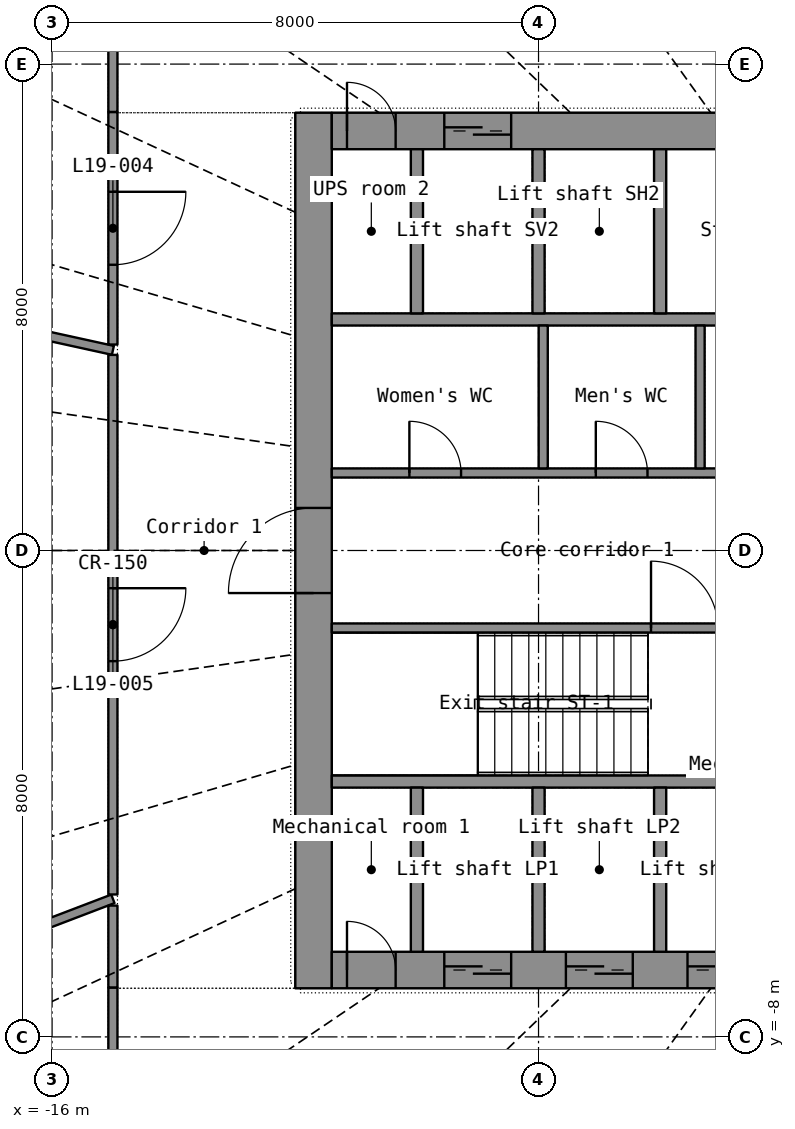
"""IFC4 building model, lengths in metres.
Left out: names, types, materials, properties, quantities, classifications, styles, units other than length and angle.
Written with IfcOpenShell. Run it as: python <this file> out.ifc"""

import sys

from ifc_helpers import new_model, si_unit, direction, frame, frame_2d, origin, place, context, subcontext, project, spatial, rectangle, extrude, element, fill, save


model = new_model("IFC4")
c1 = context("Model", 3, precision=1e-05, world=origin(), true_north=direction((0.0, 1.0)))
c2 = subcontext(c1, "Body", "Model", "MODEL_VIEW")
j1 = project(units=[si_unit("LENGTHUNIT", "METRE"), si_unit("PLANEANGLEUNIT", "RADIAN")], contexts=[c1])
p1 = place(None, origin())
s1 = spatial("IfcSite", under=j1, at=p1, CompositionType="ELEMENT")
p2 = place(p1, origin())
s2 = spatial("IfcBuilding", under=s1, at=p2, CompositionType="ELEMENT")
p3 = place(p2, frame((0.0, 0.0, 81.5)))
s3 = spatial("IfcBuildingStorey", under=s2, at=p3, CompositionType="ELEMENT", Elevation=81.5)
p4 = place(p3, frame((-11.7, -7.2, 0.0), z_axis=(0.0, 0.0, 1.0), x_axis=(0.0, 1.0, 0.0)))
e1 = element("IfcWall", 1, at=p4, inside=s3, PredefinedType="SHEAR", context=c2, shape_type="SweptSolid", body=[
    extrude(rectangle(XDim=14.4, YDim=0.6, at=frame_2d((7.2, 0.0))), origin(), (0.0, 0.0, 1.0), 3.3),
])
p5 = place(p4, frame((6.5, 0.0, 0.0)))
e2 = element("IfcOpeningElement", 2, at=p5, cuts=e1, PredefinedType="OPENING", context=c2, shape_type="SweptSolid", body=[
    extrude(rectangle(XDim=1.4, YDim=2.2, at=frame_2d((0.7, 1.1))), frame((0.0, 0.31, 0.0), z_axis=(0.0, -1.0, 0.0), x_axis=(1.0, 0.0, 0.0)), (0.0, 0.0, 1.0), 0.62),
])
p6 = place(p3, frame((-11.4, -6.9, 0.0), z_axis=(0.0, 0.0, 1.0), x_axis=(1.0, 0.0, 0.0)))
e3 = element("IfcWall", 3, at=p6, inside=s3, PredefinedType="SHEAR", context=c2, shape_type="SweptSolid", body=[
    extrude(rectangle(XDim=22.8, YDim=0.6, at=frame_2d((11.4, 0.0))), origin(), (0.0, 0.0, 1.0), 3.3),
])
p7 = place(p6, frame((1.85, 0.0, 0.0)))
e4 = element("IfcOpeningElement", 4, at=p7, cuts=e3, PredefinedType="OPENING", context=c2, shape_type="SweptSolid", body=[
    extrude(rectangle(XDim=1.1, YDim=2.2, at=frame_2d((0.55, 1.1))), frame((0.0, 0.31, 0.0), z_axis=(0.0, -1.0, 0.0), x_axis=(1.0, 0.0, 0.0)), (0.0, 0.0, 1.0), 0.62),
])
p8 = place(p6, frame((3.85, 0.0, 0.0)))
e5 = element("IfcOpeningElement", 5, at=p8, cuts=e3, PredefinedType="OPENING", context=c2, shape_type="SweptSolid", body=[
    extrude(rectangle(XDim=1.1, YDim=2.2, at=frame_2d((0.55, 1.1))), frame((0.0, 0.31, 0.0), z_axis=(0.0, -1.0, 0.0), x_axis=(1.0, 0.0, 0.0)), (0.0, 0.0, 1.0), 0.62),
])
p9 = place(p6, frame((5.85, 0.0, 0.0)))
e6 = element("IfcOpeningElement", 6, at=p9, cuts=e3, PredefinedType="OPENING", context=c2, shape_type="SweptSolid", body=[
    extrude(rectangle(XDim=1.1, YDim=2.2, at=frame_2d((0.55, 1.1))), frame((0.0, 0.31, 0.0), z_axis=(0.0, -1.0, 0.0), x_axis=(1.0, 0.0, 0.0)), (0.0, 0.0, 1.0), 0.62),
])
p10 = place(p6, frame((7.85, 0.0, 0.0)))
e7 = element("IfcOpeningElement", 7, at=p10, cuts=e3, PredefinedType="OPENING", context=c2, shape_type="SweptSolid", body=[
    extrude(rectangle(XDim=1.1, YDim=2.2, at=frame_2d((0.55, 1.1))), frame((0.0, 0.31, 0.0), z_axis=(0.0, -1.0, 0.0), x_axis=(1.0, 0.0, 0.0)), (0.0, 0.0, 1.0), 0.62),
])
p11 = place(p6, frame((9.85, 0.0, 0.0)))
e8 = element("IfcOpeningElement", 8, at=p11, cuts=e3, PredefinedType="OPENING", context=c2, shape_type="SweptSolid", body=[
    extrude(rectangle(XDim=1.1, YDim=2.2, at=frame_2d((0.55, 1.1))), frame((0.0, 0.31, 0.0), z_axis=(0.0, -1.0, 0.0), x_axis=(1.0, 0.0, 0.0)), (0.0, 0.0, 1.0), 0.62),
])
p12 = place(p6, frame((11.85, 0.0, 0.0)))
e9 = element("IfcOpeningElement", 9, at=p12, cuts=e3, PredefinedType="OPENING", context=c2, shape_type="SweptSolid", body=[
    extrude(rectangle(XDim=1.1, YDim=2.2, at=frame_2d((0.55, 1.1))), frame((0.0, 0.31, 0.0), z_axis=(0.0, -1.0, 0.0), x_axis=(1.0, 0.0, 0.0)), (0.0, 0.0, 1.0), 0.62),
])
p13 = place(p6, frame((13.85, 0.0, 0.0)))
e10 = element("IfcOpeningElement", 10, at=p13, cuts=e3, PredefinedType="OPENING", context=c2, shape_type="SweptSolid", body=[
    extrude(rectangle(XDim=1.1, YDim=2.2, at=frame_2d((0.55, 1.1))), frame((0.0, 0.31, 0.0), z_axis=(0.0, -1.0, 0.0), x_axis=(1.0, 0.0, 0.0)), (0.0, 0.0, 1.0), 0.62),
])
p14 = place(p6, frame((15.85, 0.0, 0.0)))
e11 = element("IfcOpeningElement", 11, at=p14, cuts=e3, PredefinedType="OPENING", context=c2, shape_type="SweptSolid", body=[
    extrude(rectangle(XDim=1.1, YDim=2.2, at=frame_2d((0.55, 1.1))), frame((0.0, 0.31, 0.0), z_axis=(0.0, -1.0, 0.0), x_axis=(1.0, 0.0, 0.0)), (0.0, 0.0, 1.0), 0.62),
])
p15 = place(p6, frame((19.85, 0.0, 0.0)))
e12 = element("IfcOpeningElement", 12, at=p15, cuts=e3, PredefinedType="OPENING", context=c2, shape_type="SweptSolid", body=[
    extrude(rectangle(XDim=1.1, YDim=2.2, at=frame_2d((0.55, 1.1))), frame((0.0, 0.31, 0.0), z_axis=(0.0, -1.0, 0.0), x_axis=(1.0, 0.0, 0.0)), (0.0, 0.0, 1.0), 0.62),
])
p16 = place(p6, frame((0.25, 0.0, 0.0)))
e13 = element("IfcOpeningElement", 13, at=p16, cuts=e3, PredefinedType="OPENING", context=c2, shape_type="SweptSolid", body=[
    extrude(rectangle(XDim=0.8, YDim=2.05, at=frame_2d((0.4, 1.025))), frame((0.0, 0.31, 0.0), z_axis=(0.0, -1.0, 0.0), x_axis=(1.0, 0.0, 0.0)), (0.0, 0.0, 1.0), 0.62),
])
p17 = place(p6, frame((21.75, 0.0, 0.0)))
e14 = element("IfcOpeningElement", 14, at=p17, cuts=e3, PredefinedType="OPENING", context=c2, shape_type="SweptSolid", body=[
    extrude(rectangle(XDim=0.8, YDim=2.05, at=frame_2d((0.4, 1.025))), frame((0.0, 0.31, 0.0), z_axis=(0.0, -1.0, 0.0), x_axis=(1.0, 0.0, 0.0)), (0.0, 0.0, 1.0), 0.62),
])
p18 = place(p3, frame((-11.4, 6.9, 0.0), z_axis=(0.0, 0.0, 1.0), x_axis=(1.0, 0.0, 0.0)))
e15 = element("IfcWall", 15, at=p18, inside=s3, PredefinedType="SHEAR", context=c2, shape_type="SweptSolid", body=[
    extrude(rectangle(XDim=22.8, YDim=0.6, at=frame_2d((11.4, 0.0))), origin(), (0.0, 0.0, 1.0), 3.3),
])
p19 = place(p18, frame((1.85, 0.0, 0.0)))
e16 = element("IfcOpeningElement", 16, at=p19, cuts=e15, PredefinedType="OPENING", context=c2, shape_type="SweptSolid", body=[
    extrude(rectangle(XDim=1.1, YDim=2.2, at=frame_2d((0.55, 1.1))), frame((0.0, 0.31, 0.0), z_axis=(0.0, -1.0, 0.0), x_axis=(1.0, 0.0, 0.0)), (0.0, 0.0, 1.0), 0.62),
])
p20 = place(p18, frame((6.95, 0.0, 0.0)))
e17 = element("IfcOpeningElement", 17, at=p20, cuts=e15, PredefinedType="OPENING", context=c2, shape_type="SweptSolid", body=[
    extrude(rectangle(XDim=0.9, YDim=2.1, at=frame_2d((0.45, 1.05))), frame((0.0, 0.31, 0.0), z_axis=(0.0, -1.0, 0.0), x_axis=(1.0, 0.0, 0.0)), (0.0, 0.0, 1.0), 0.62),
])
p21 = place(p18, frame((12.95, 0.0, 0.0)))
e18 = element("IfcOpeningElement", 18, at=p21, cuts=e15, PredefinedType="OPENING", context=c2, shape_type="SweptSolid", body=[
    extrude(rectangle(XDim=0.9, YDim=2.1, at=frame_2d((0.45, 1.05))), frame((0.0, 0.31, 0.0), z_axis=(0.0, -1.0, 0.0), x_axis=(1.0, 0.0, 0.0)), (0.0, 0.0, 1.0), 0.62),
])
p22 = place(p18, frame((18.95, 0.0, 0.0)))
e19 = element("IfcOpeningElement", 19, at=p22, cuts=e15, PredefinedType="OPENING", context=c2, shape_type="SweptSolid", body=[
    extrude(rectangle(XDim=0.9, YDim=2.1, at=frame_2d((0.45, 1.05))), frame((0.0, 0.31, 0.0), z_axis=(0.0, -1.0, 0.0), x_axis=(1.0, 0.0, 0.0)), (0.0, 0.0, 1.0), 0.62),
])
p23 = place(p18, frame((0.25, 0.0, 0.0)))
e20 = element("IfcOpeningElement", 20, at=p23, cuts=e15, PredefinedType="OPENING", context=c2, shape_type="SweptSolid", body=[
    extrude(rectangle(XDim=0.8, YDim=2.05, at=frame_2d((0.4, 1.025))), frame((0.0, 0.31, 0.0), z_axis=(0.0, -1.0, 0.0), x_axis=(1.0, 0.0, 0.0)), (0.0, 0.0, 1.0), 0.62),
])
p24 = place(p18, frame((21.75, 0.0, 0.0)))
e21 = element("IfcOpeningElement", 21, at=p24, cuts=e15, PredefinedType="OPENING", context=c2, shape_type="SweptSolid", body=[
    extrude(rectangle(XDim=0.8, YDim=2.05, at=frame_2d((0.4, 1.025))), frame((0.0, 0.31, 0.0), z_axis=(0.0, -1.0, 0.0), x_axis=(1.0, 0.0, 0.0)), (0.0, 0.0, 1.0), 0.62),
])
for number, where, z_axis, x_axis in (
    (22, (-11.4, -3.8, 0.0), (0.0, 0.0, 1.0), (1.0, 0.0, 0.0)),
    (23, (-11.4, 3.8, 0.0), (0.0, 0.0, 1.0), (1.0, 0.0, 0.0)),
):
    element("IfcWall", number, at=place(p3, frame(where, z_axis=z_axis, x_axis=x_axis)), inside=s3, PredefinedType="SHEAR", context=c2, shape_type="SweptSolid", body=[
        extrude(rectangle(XDim=22.8, YDim=0.2, at=frame_2d((11.4, 0.0))), origin(), (0.0, 0.0, 1.0), 3.3),
    ])
for number, where, z_axis, x_axis in (
    (24, (-10.0, -6.6, 0.0), (0.0, 0.0, 1.0), (0.0, 1.0, 0.0)),
    (25, (-8.0, -6.6, 0.0), (0.0, 0.0, 1.0), (0.0, 1.0, 0.0)),
    (26, (-6.0, -6.6, 0.0), (0.0, 0.0, 1.0), (0.0, 1.0, 0.0)),
    (27, (-10.0, 3.9, 0.0), (0.0, 0.0, 1.0), (0.0, 1.0, 0.0)),
    (28, (-8.0, 3.9, 0.0), (0.0, 0.0, 1.0), (0.0, 1.0, 0.0)),
    (29, (-6.0, 3.9, 0.0), (0.0, 0.0, 1.0), (0.0, 1.0, 0.0)),
):
    element("IfcWall", number, at=place(p3, frame(where, z_axis=z_axis, x_axis=x_axis)), inside=s3, PredefinedType="SHEAR", context=c2, shape_type="SweptSolid", body=[
        extrude(rectangle(XDim=2.7, YDim=0.2, at=frame_2d((1.35, 0.0))), origin(), (0.0, 0.0, 1.0), 3.3),
    ])
p25 = place(p3, frame((-11.4, -1.275, 0.0), z_axis=(0.0, 0.0, 1.0), x_axis=(1.0, 0.0, 0.0)))
e30 = element("IfcWall", 30, at=p25, inside=s3, PredefinedType="SHEAR", context=c2, shape_type="SweptSolid", body=[
    extrude(rectangle(XDim=8.4, YDim=0.15, at=frame_2d((4.2, 0.0))), origin(), (0.0, 0.0, 1.0), 3.3),
])
p26 = place(p25, frame((5.25, 0.0, 0.0)))
e31 = element("IfcOpeningElement", 31, at=p26, cuts=e30, PredefinedType="OPENING", context=c2, shape_type="SweptSolid", body=[
    extrude(rectangle(XDim=1.1, YDim=2.15, at=frame_2d((0.55, 1.075))), frame((0.0, 0.085, 0.0), z_axis=(0.0, -1.0, 0.0), x_axis=(1.0, 0.0, 0.0)), (0.0, 0.0, 1.0), 0.17),
])
p27 = place(p25, frame((7.05, 0.0, 0.0)))
e32 = element("IfcOpeningElement", 32, at=p27, cuts=e30, PredefinedType="OPENING", context=c2, shape_type="SweptSolid", body=[
    extrude(rectangle(XDim=0.9, YDim=2.1, at=frame_2d((0.45, 1.05))), frame((0.0, 0.085, 0.0), z_axis=(0.0, -1.0, 0.0), x_axis=(1.0, 0.0, 0.0)), (0.0, 0.0, 1.0), 0.17),
])
p28 = place(p3, frame((-11.4, 1.275, 0.0), z_axis=(0.0, 0.0, 1.0), x_axis=(1.0, 0.0, 0.0)))
e33 = element("IfcWall", 33, at=p28, inside=s3, PredefinedType="PARTITIONING", context=c2, shape_type="SweptSolid", body=[
    extrude(rectangle(XDim=8.4, YDim=0.15, at=frame_2d((4.2, 0.0))), origin(), (0.0, 0.0, 1.0), 3.3),
])
p29 = place(p28, frame((1.276, 0.0, 0.0)))
e34 = element("IfcOpeningElement", 34, at=p29, cuts=e33, PredefinedType="OPENING", context=c2, shape_type="SweptSolid", body=[
    extrude(rectangle(XDim=0.85, YDim=2.1, at=frame_2d((0.425, 1.05))), frame((0.0, 0.085, 0.0), z_axis=(0.0, -1.0, 0.0), x_axis=(1.0, 0.0, 0.0)), (0.0, 0.0, 1.0), 0.17),
])
p30 = place(p28, frame((4.342, 0.0, 0.0)))
e35 = element("IfcOpeningElement", 35, at=p30, cuts=e33, PredefinedType="OPENING", context=c2, shape_type="SweptSolid", body=[
    extrude(rectangle(XDim=0.85, YDim=2.1, at=frame_2d((0.425, 1.05))), frame((0.0, 0.085, 0.0), z_axis=(0.0, -1.0, 0.0), x_axis=(1.0, 0.0, 0.0)), (0.0, 0.0, 1.0), 0.17),
])
p31 = place(p28, frame((6.816, 0.0, 0.0)))
e36 = element("IfcOpeningElement", 36, at=p31, cuts=e33, PredefinedType="OPENING", context=c2, shape_type="SweptSolid", body=[
    extrude(rectangle(XDim=0.9, YDim=2.1, at=frame_2d((0.45, 1.05))), frame((0.0, 0.085, 0.0), z_axis=(0.0, -1.0, 0.0), x_axis=(1.0, 0.0, 0.0)), (0.0, 0.0, 1.0), 0.17),
])
for number, where, z_axis, x_axis in (
    (37, (-7.923, 1.35, 0.0), (0.0, 0.0, 1.0), (0.0, 1.0, 0.0)),
    (38, (-5.343, 1.35, 0.0), (0.0, 0.0, 1.0), (0.0, 1.0, 0.0)),
):
    element("IfcWall", number, at=place(p3, frame(where, z_axis=z_axis, x_axis=x_axis)), inside=s3, PredefinedType="PARTITIONING", context=c2, shape_type="SweptSolid", body=[
        extrude(rectangle(XDim=2.35, YDim=0.15, at=frame_2d((1.175, 0.0))), origin(), (0.0, 0.0, 1.0), 3.3),
    ])
p32 = place(p3, frame((-25.508, 5.599, 0.0), z_axis=(0.0, 0.0, 1.0), x_axis=(0.976750254, -0.214380365, 0.0)))
e39 = element("IfcWall", 39, at=p32, inside=s3, PredefinedType="PARTITIONING", context=c2, shape_type="SweptSolid", body=[
    extrude(rectangle(XDim=10.759, YDim=0.15, at=frame_2d((5.379, 0.0))), origin(), (0.0, 0.0, 1.0), 2.4),
])
p33 = place(p3, frame((-23.929, -9.14, 0.0), z_axis=(0.0, 0.0, 1.0), x_axis=(0.934175823, 0.356813021, 0.0)))
e40 = element("IfcWall", 40, at=p33, inside=s3, PredefinedType="PARTITIONING", context=c2, shape_type="SweptSolid", body=[
    extrude(rectangle(XDim=9.559, YDim=0.15, at=frame_2d((4.779, 0.0))), origin(), (0.0, 0.0, 1.0), 2.4),
])
p34 = place(p3, frame((-15.0, 3.217, 0.0), z_axis=(0.0, 0.0, 1.0), x_axis=(0.0, -1.0, 0.0)))
e41 = element("IfcWall", 41, at=p34, inside=s3, PredefinedType="PARTITIONING", context=c2, shape_type="SweptSolid", body=[
    extrude(rectangle(XDim=8.874, YDim=0.15, at=frame_2d((4.437, 0.0))), origin(), (0.0, 0.0, 1.0), 2.4),
])
p35 = place(p34, frame((3.837, 0.0, 0.0)))
e42 = element("IfcOpeningElement", 42, at=p35, cuts=e41, PredefinedType="OPENING", context=c2, shape_type="SweptSolid", body=[
    extrude(rectangle(XDim=1.2, YDim=2.2, at=frame_2d((0.6, 1.1))), frame((0.0, 0.085, 0.0), z_axis=(0.0, -1.0, 0.0), x_axis=(1.0, 0.0, 0.0)), (0.0, 0.0, 1.0), 0.17),
])
p36 = place(p3, frame((-15.0, 7.212, 0.0), z_axis=(0.0, 0.0, 1.0), x_axis=(0.0, -1.0, 0.0)))
e43 = element("IfcWall", 43, at=p36, inside=s3, PredefinedType="PARTITIONING", context=c2, shape_type="SweptSolid", body=[
    extrude(rectangle(XDim=3.824, YDim=0.15, at=frame_2d((1.912, 0.0))), origin(), (0.0, 0.0, 1.0), 2.4),
])
p37 = place(p36, frame((1.312, 0.0, 0.0)))
e44 = element("IfcOpeningElement", 44, at=p37, cuts=e43, PredefinedType="OPENING", context=c2, shape_type="SweptSolid", body=[
    extrude(rectangle(XDim=1.2, YDim=2.2, at=frame_2d((0.6, 1.1))), frame((0.0, 0.085, 0.0), z_axis=(0.0, -1.0, 0.0), x_axis=(1.0, 0.0, 0.0)), (0.0, 0.0, 1.0), 0.17),
])
p38 = place(p3, frame((-15.0, -7.188, 0.0), z_axis=(0.0, 0.0, 1.0), x_axis=(0.0, -1.0, 0.0)))
e45 = element("IfcWall", 45, at=p38, inside=s3, PredefinedType="PARTITIONING", context=c2, shape_type="SweptSolid", body=[
    extrude(rectangle(XDim=2.335, YDim=0.15, at=frame_2d((1.167, 0.0))), origin(), (0.0, 0.0, 1.0), 2.4),
])
p39 = place(p3, frame((-15.0, -5.84, 0.0), z_axis=(0.0, 0.0, 1.0), x_axis=(0.0, -1.0, 0.0)))
e46 = element("IfcWall", 46, at=p39, inside=s3, PredefinedType="PARTITIONING", context=c2, shape_type="SweptSolid", body=[
    extrude(rectangle(XDim=1.347, YDim=0.15, at=frame_2d((0.673, 0.0))), origin(), (0.0, 0.0, 1.0), 2.4),
])
p40 = place(p3, frame((-15.0, 8.536, 0.0), z_axis=(0.0, 0.0, 1.0), x_axis=(0.0, -1.0, 0.0)))
e47 = element("IfcWall", 47, at=p40, inside=s3, PredefinedType="PARTITIONING", context=c2, shape_type="SweptSolid", body=[
    extrude(rectangle(XDim=1.323, YDim=0.15, at=frame_2d((0.662, 0.0))), origin(), (0.0, 0.0, 1.0), 2.4),
])
p41 = place(p7, origin())
e48 = element("IfcDoor", 48, at=p41, inside=s3, OperationType="DOUBLE_DOOR_SLIDING", PredefinedType="DOOR", context=c2, shape_type="SweptSolid", body=[
    extrude(rectangle(XDim=1.1, YDim=2.2, at=frame_2d((0.55, 1.1))), frame((0.0, 0.025, 0.0), z_axis=(0.0, -1.0, 0.0), x_axis=(1.0, 0.0, 0.0)), (0.0, 0.0, 1.0), 0.05),
])
fill(e4, e48)
p42 = place(p8, origin())
e49 = element("IfcDoor", 49, at=p42, inside=s3, OperationType="DOUBLE_DOOR_SLIDING", PredefinedType="DOOR", context=c2, shape_type="SweptSolid", body=[
    extrude(rectangle(XDim=1.1, YDim=2.2, at=frame_2d((0.55, 1.1))), frame((0.0, 0.025, 0.0), z_axis=(0.0, -1.0, 0.0), x_axis=(1.0, 0.0, 0.0)), (0.0, 0.0, 1.0), 0.05),
])
fill(e5, e49)
p43 = place(p9, origin())
e50 = element("IfcDoor", 50, at=p43, inside=s3, OperationType="DOUBLE_DOOR_SLIDING", PredefinedType="DOOR", context=c2, shape_type="SweptSolid", body=[
    extrude(rectangle(XDim=1.1, YDim=2.2, at=frame_2d((0.55, 1.1))), frame((0.0, 0.025, 0.0), z_axis=(0.0, -1.0, 0.0), x_axis=(1.0, 0.0, 0.0)), (0.0, 0.0, 1.0), 0.05),
])
fill(e6, e50)
p44 = place(p16, origin())
e51 = element("IfcDoor", 51, at=p44, inside=s3, OperationType="SINGLE_SWING_LEFT", PredefinedType="DOOR", context=c2, shape_type="SweptSolid", body=[
    extrude(rectangle(XDim=0.8, YDim=2.05, at=frame_2d((0.4, 1.025))), frame((0.0, 0.025, 0.0), z_axis=(0.0, -1.0, 0.0), x_axis=(1.0, 0.0, 0.0)), (0.0, 0.0, 1.0), 0.05),
])
fill(e13, e51)
p45 = place(p19, origin())
e52 = element("IfcDoor", 52, at=p45, inside=s3, OperationType="DOUBLE_DOOR_SLIDING", PredefinedType="DOOR", context=c2, shape_type="SweptSolid", body=[
    extrude(rectangle(XDim=1.1, YDim=2.2, at=frame_2d((0.55, 1.1))), frame((0.0, 0.025, 0.0), z_axis=(0.0, -1.0, 0.0), x_axis=(1.0, 0.0, 0.0)), (0.0, 0.0, 1.0), 0.05),
])
fill(e16, e52)
p46 = place(p23, origin())
e53 = element("IfcDoor", 53, at=p46, inside=s3, OperationType="SINGLE_SWING_LEFT", PredefinedType="DOOR", context=c2, shape_type="SweptSolid", body=[
    extrude(rectangle(XDim=0.8, YDim=2.05, at=frame_2d((0.4, 1.025))), frame((0.0, 0.025, 0.0), z_axis=(0.0, -1.0, 0.0), x_axis=(1.0, 0.0, 0.0)), (0.0, 0.0, 1.0), 0.05),
])
fill(e20, e53)
p47 = place(p5, origin())
e54 = element("IfcDoor", 54, at=p47, inside=s3, OperationType="DOUBLE_DOOR_SINGLE_SWING", PredefinedType="DOOR", context=c2, shape_type="SweptSolid", body=[
    extrude(rectangle(XDim=1.4, YDim=2.2, at=frame_2d((0.7, 1.1))), frame((0.0, 0.025, 0.0), z_axis=(0.0, -1.0, 0.0), x_axis=(1.0, 0.0, 0.0)), (0.0, 0.0, 1.0), 0.05),
])
fill(e2, e54)
p48 = place(p26, origin())
e55 = element("IfcDoor", 55, at=p48, inside=s3, OperationType="SINGLE_SWING_LEFT", PredefinedType="DOOR", context=c2, shape_type="SweptSolid", body=[
    extrude(rectangle(XDim=1.1, YDim=2.15, at=frame_2d((0.55, 1.075))), frame((0.0, 0.025, 0.0), z_axis=(0.0, -1.0, 0.0), x_axis=(1.0, 0.0, 0.0)), (0.0, 0.0, 1.0), 0.05),
])
fill(e31, e55)
p49 = place(p29, origin())
e56 = element("IfcDoor", 56, at=p49, inside=s3, OperationType="SINGLE_SWING_LEFT", PredefinedType="DOOR", context=c2, shape_type="SweptSolid", body=[
    extrude(rectangle(XDim=0.85, YDim=2.1, at=frame_2d((0.425, 1.05))), frame((0.0, 0.025, 0.0), z_axis=(0.0, -1.0, 0.0), x_axis=(1.0, 0.0, 0.0)), (0.0, 0.0, 1.0), 0.05),
])
fill(e34, e56)
p50 = place(p30, origin())
e57 = element("IfcDoor", 57, at=p50, inside=s3, OperationType="SINGLE_SWING_LEFT", PredefinedType="DOOR", context=c2, shape_type="SweptSolid", body=[
    extrude(rectangle(XDim=0.85, YDim=2.1, at=frame_2d((0.425, 1.05))), frame((0.0, 0.025, 0.0), z_axis=(0.0, -1.0, 0.0), x_axis=(1.0, 0.0, 0.0)), (0.0, 0.0, 1.0), 0.05),
])
fill(e35, e57)
p51 = place(p37, origin())
e58 = element("IfcDoor", 58, at=p51, inside=s3, OperationType="DOUBLE_DOOR_SINGLE_SWING", PredefinedType="DOOR", context=c2, shape_type="SweptSolid", body=[
    extrude(rectangle(XDim=1.2, YDim=2.2, at=frame_2d((0.6, 1.1))), frame((0.0, 0.025, 0.0), z_axis=(0.0, -1.0, 0.0), x_axis=(1.0, 0.0, 0.0)), (0.0, 0.0, 1.0), 0.05),
])
fill(e44, e58)
p52 = place(p35, origin())
e59 = element("IfcDoor", 59, at=p52, inside=s3, OperationType="DOUBLE_DOOR_SINGLE_SWING", PredefinedType="DOOR", context=c2, shape_type="SweptSolid", body=[
    extrude(rectangle(XDim=1.2, YDim=2.2, at=frame_2d((0.6, 1.1))), frame((0.0, 0.025, 0.0), z_axis=(0.0, -1.0, 0.0), x_axis=(1.0, 0.0, 0.0)), (0.0, 0.0, 1.0), 0.05),
])
fill(e42, e59)
save(model, sys.argv[1])
